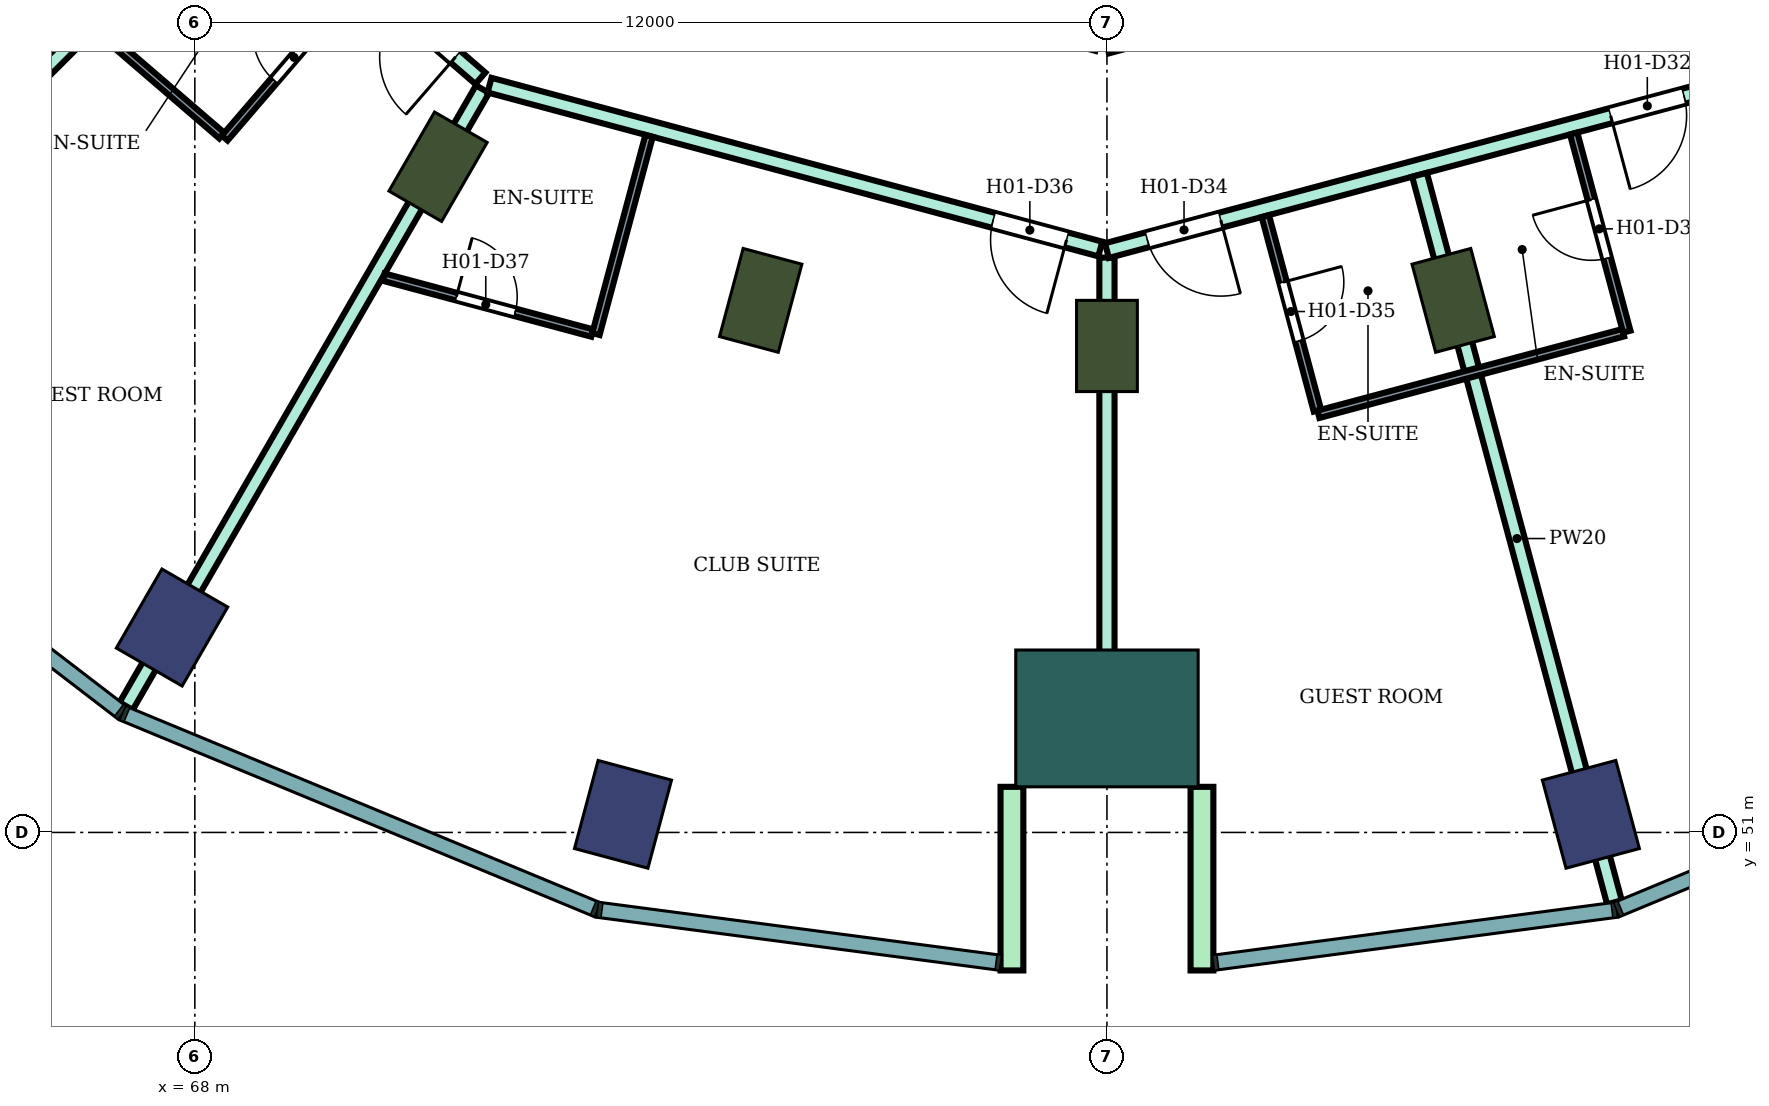
"""IFC4 building model, lengths in metres.
Left out: names, types, materials, properties, quantities, classifications, styles, units other than length and angle.
Written with IfcOpenShell. Run it as: python <this file> out.ifc"""

import sys

from ifc_helpers import new_model, si_unit, direction, frame, frame_2d, origin, origin_2d, place, context, subcontext, project, spatial, rectangle, extrude, element, fill, save


model = new_model("IFC4")
c1 = context("Model", 3, precision=1e-05, world=origin(), true_north=direction((0.0, 1.0)))
c2 = subcontext(c1, "Body", "Model", "MODEL_VIEW")
j1 = project(units=[si_unit("LENGTHUNIT", "METRE"), si_unit("PLANEANGLEUNIT", "RADIAN")], contexts=[c1])
p1 = place(None, origin())
s1 = spatial("IfcSite", under=j1, at=p1, CompositionType="ELEMENT")
p2 = place(p1, origin())
s2 = spatial("IfcBuilding", under=s1, at=p2, CompositionType="ELEMENT")
p3 = place(p2, frame((0.0, 0.0, 32.6)))
s3 = spatial("IfcBuildingStorey", under=s2, at=p3, CompositionType="ELEMENT", Elevation=32.6)
for number, where, z_axis, x_axis in (
    (1, (67.7, 53.696, 0.0), (0.0, 0.0, 1.0), (-0.5, -0.866, 0.0)),
    (2, (73.633, 51.238, 0.0), (0.0, 0.0, 1.0), (-0.259, -0.966, 0.0)),
    (3, (86.367, 51.238, 0.0), (0.0, 0.0, 1.0), (0.259, -0.966, 0.0)),
):
    element("IfcColumn", number, at=place(p3, frame(where, z_axis=z_axis, x_axis=x_axis)), inside=s3, PredefinedType="COLUMN", context=c2, shape_type="SweptSolid", body=[
        extrude(rectangle(XDim=1.2, YDim=1.0, at=origin_2d()), origin(), (0.0, 0.0, 1.0), 3.8),
    ])
for number, where, z_axis, x_axis in (
    (4, (71.2, 59.758, 0.0), (0.0, 0.0, 1.0), (-0.5, -0.866, 0.0)),
    (5, (75.445, 58.0, 0.0), (0.0, 0.0, 1.0), (-0.259, -0.966, 0.0)),
    (6, (80.0, 57.4, 0.0), (0.0, 0.0, 1.0), (0.0, -1.0, 0.0)),
    (7, (84.555, 58.0, 0.0), (0.0, 0.0, 1.0), (0.259, -0.966, 0.0)),
):
    element("IfcColumn", number, at=place(p3, frame(where, z_axis=z_axis, x_axis=x_axis)), inside=s3, PredefinedType="COLUMN", context=c2, shape_type="SweptSolid", body=[
        extrude(rectangle(XDim=1.2, YDim=0.8, at=origin_2d()), origin(), (0.0, 0.0, 1.0), 3.8),
    ])
p4 = place(p3, frame((80.0, 52.5, 0.0), z_axis=(0.0, 0.0, 1.0), x_axis=(0.0, -1.0, 0.0)))
e8 = element("IfcColumn", 8, at=p4, inside=s3, PredefinedType="COLUMN", context=c2, shape_type="SweptSolid", body=[
    extrude(rectangle(XDim=1.8, YDim=2.4, at=origin_2d()), origin(), (0.0, 0.0, 1.0), 3.8),
])
for number, where, z_axis, x_axis in (
    (9, (78.75, 51.6, 0.0), (0.0, 0.0, 1.0), (0.0, -1.0, 0.0)),
    (10, (81.25, 51.6, 0.0), (0.0, 0.0, 1.0), (0.0, -1.0, 0.0)),
):
    element("IfcWall", number, at=place(p3, frame(where, z_axis=z_axis, x_axis=x_axis)), inside=s3, PredefinedType="NOTDEFINED", context=c2, shape_type="SweptSolid", body=[
        extrude(rectangle(XDim=2.416, YDim=0.3, at=frame_2d((1.208, 0.0))), origin(), (0.0, 0.0, 1.0), 3.8),
    ])
p5 = place(p3, frame((63.592, 58.599, 0.0), z_axis=(0.0, 0.0, 1.0), x_axis=(0.707228748718, 0.706984792613, 0.0)))
e11 = element("IfcWall", 11, at=p5, inside=s3, PredefinedType="PARTITIONING", context=c2, shape_type="SweptSolid", body=[
    extrude(rectangle(XDim=7.005, YDim=0.2, at=frame_2d((3.503, 0.0))), origin(), (0.0, 0.0, 1.0), 3.35),
])
p6 = place(p3, frame((67.078, 64.968, 0.0), z_axis=(0.0, 0.0, 1.0), x_axis=(0.756371089567, -0.654142778656, 0.0)))
e12 = element("IfcWall", 12, at=p6, inside=s3, PredefinedType="PARTITIONING", context=c2, shape_type="SweptSolid", body=[
    extrude(rectangle(XDim=6.185, YDim=0.2, at=frame_2d((3.093, 0.0))), origin(), (0.0, 0.0, 1.0), 3.35),
])
p7 = place(p6, frame((4.755, 0.0, 0.0)))
e13 = element("IfcOpeningElement", 13, at=p7, cuts=e12, PredefinedType="OPENING", context=c2, shape_type="SweptSolid", body=[
    extrude(rectangle(XDim=1.0, YDim=2.1, at=frame_2d((0.5, 1.05))), frame((0.0, 0.11, 0.0), z_axis=(0.0, -1.0, 0.0), x_axis=(1.0, 0.0, 0.0)), (0.0, 0.0, 1.0), 0.22),
])
p8 = place(p3, frame((67.096, 52.662, 0.0), z_axis=(0.0, 0.0, 1.0), x_axis=(0.500242450002, 0.865885379953, 0.0)))
e14 = element("IfcWall", 14, at=p8, inside=s3, PredefinedType="PARTITIONING", context=c2, shape_type="SweptSolid", body=[
    extrude(rectangle(XDim=9.374, YDim=0.2, at=frame_2d((4.687, 0.0))), origin(), (0.0, 0.0, 1.0), 3.35),
])
p9 = place(p3, frame((71.877, 60.831, 0.0), z_axis=(0.0, 0.0, 1.0), x_axis=(0.965852509869, -0.259092510851, 0.0)))
e15 = element("IfcWall", 15, at=p9, inside=s3, PredefinedType="PARTITIONING", context=c2, shape_type="SweptSolid", body=[
    extrude(rectangle(XDim=8.32, YDim=0.2, at=frame_2d((4.16, 0.0))), origin(), (0.0, 0.0, 1.0), 3.35),
])
p10 = place(p9, frame((6.86, 0.0, 0.0)))
e16 = element("IfcOpeningElement", 16, at=p10, cuts=e15, PredefinedType="OPENING", context=c2, shape_type="SweptSolid", body=[
    extrude(rectangle(XDim=1.0, YDim=2.1, at=frame_2d((0.5, 1.05))), frame((0.0, 0.11, 0.0), z_axis=(0.0, -1.0, 0.0), x_axis=(1.0, 0.0, 0.0)), (0.0, 0.0, 1.0), 0.22),
])
p11 = place(p3, frame((80.0, 51.801, 0.0), z_axis=(0.0, 0.0, 1.0), x_axis=(0.0, 1.0, 0.0)))
e17 = element("IfcWall", 17, at=p11, inside=s3, PredefinedType="PARTITIONING", context=c2, shape_type="SweptSolid", body=[
    extrude(rectangle(XDim=6.762, YDim=0.2, at=frame_2d((3.381, 0.0))), origin(), (0.0, 0.0, 1.0), 3.35),
])
p12 = place(p3, frame((80.0, 58.655, 0.0), z_axis=(0.0, 0.0, 1.0), x_axis=(0.965974635626, 0.258636817424, 0.0)))
e18 = element("IfcWall", 18, at=p12, inside=s3, PredefinedType="PARTITIONING", context=c2, shape_type="SweptSolid", body=[
    extrude(rectangle(XDim=8.36, YDim=0.2, at=frame_2d((4.18, 0.0))), origin(), (0.0, 0.0, 1.0), 3.35),
])
p13 = place(p12, frame((6.86, 0.0, 0.0)))
e19 = element("IfcOpeningElement", 19, at=p13, cuts=e18, PredefinedType="OPENING", context=c2, shape_type="SweptSolid", body=[
    extrude(rectangle(XDim=1.0, YDim=2.1, at=frame_2d((0.5, 1.05))), frame((0.0, 0.11, 0.0), z_axis=(0.0, -1.0, 0.0), x_axis=(1.0, 0.0, 0.0)), (0.0, 0.0, 1.0), 0.22),
])
p14 = place(p12, frame((0.55, 0.0, 0.0)))
e20 = element("IfcOpeningElement", 20, at=p14, cuts=e18, PredefinedType="OPENING", context=c2, shape_type="SweptSolid", body=[
    extrude(rectangle(XDim=1.0, YDim=2.1, at=frame_2d((0.5, 1.05))), frame((0.0, 0.11, 0.0), z_axis=(0.0, -1.0, 0.0), x_axis=(1.0, 0.0, 0.0)), (0.0, 0.0, 1.0), 0.22),
])
p15 = place(p3, frame((80.0, 61.346, 0.0), z_axis=(0.0, 0.0, 1.0), x_axis=(0.965924181808, 0.258825182312, 0.0)))
e21 = element("IfcWall", 21, at=p15, inside=s3, PredefinedType="PARTITIONING", context=c2, shape_type="SweptSolid", body=[
    extrude(rectangle(XDim=6.94, YDim=0.2, at=frame_2d((3.47, 0.0))), origin(), (0.0, 0.0, 1.0), 3.35),
])
p16 = place(p15, frame((0.55, 0.0, 0.0)))
e22 = element("IfcOpeningElement", 22, at=p16, cuts=e21, PredefinedType="OPENING", context=c2, shape_type="SweptSolid", body=[
    extrude(rectangle(XDim=1.0, YDim=2.1, at=frame_2d((0.5, 1.05))), frame((0.0, 0.11, 0.0), z_axis=(0.0, -1.0, 0.0), x_axis=(1.0, 0.0, 0.0)), (0.0, 0.0, 1.0), 0.22),
])
p17 = place(p3, frame((84.112, 59.652, 0.0), z_axis=(0.0, 0.0, 1.0), x_axis=(0.258791091927, -0.965933315886, 0.0)))
e23 = element("IfcWall", 23, at=p17, inside=s3, PredefinedType="PARTITIONING", context=c2, shape_type="SweptSolid", body=[
    extrude(rectangle(XDim=9.909, YDim=0.2, at=frame_2d((4.955, 0.0))), origin(), (0.0, 0.0, 1.0), 3.35),
])
p18 = place(p3, frame((65.209, 62.875, 0.0), z_axis=(0.0, 0.0, 1.0), x_axis=(0.757930378138, -0.652335451969, 0.0)))
e24 = element("IfcWall", 24, at=p18, inside=s3, PredefinedType="PARTITIONING", context=c2, shape_type="SweptSolid", body=[
    extrude(rectangle(XDim=4.15, YDim=0.1, at=frame_2d((2.075, 0.0))), origin(), (0.0, 0.0, 1.0), 3.35),
])
p19 = place(p3, frame((68.393, 60.135, 0.0), z_axis=(0.0, 0.0, 1.0), x_axis=(0.652061182569, 0.758166349944, 0.0)))
e25 = element("IfcWall", 25, at=p19, inside=s3, PredefinedType="PARTITIONING", context=c2, shape_type="SweptSolid", body=[
    extrude(rectangle(XDim=2.69, YDim=0.1, at=frame_2d((1.345, 0.0))), origin(), (0.0, 0.0, 1.0), 3.35),
])
p20 = place(p19, frame((1.0, 0.0, 0.0)))
e26 = element("IfcOpeningElement", 26, at=p20, cuts=e25, PredefinedType="OPENING", context=c2, shape_type="SweptSolid", body=[
    extrude(rectangle(XDim=0.8, YDim=2.1, at=frame_2d((0.4, 1.05))), frame((0.0, 0.06, 0.0), z_axis=(0.0, -1.0, 0.0), x_axis=(1.0, 0.0, 0.0)), (0.0, 0.0, 1.0), 0.12),
])
p21 = place(p3, frame((70.484, 58.305, 0.0), z_axis=(0.0, 0.0, 1.0), x_axis=(0.965904703781, -0.258897862512, 0.0)))
e27 = element("IfcWall", 27, at=p21, inside=s3, PredefinedType="PARTITIONING", context=c2, shape_type="SweptSolid", body=[
    extrude(rectangle(XDim=2.841, YDim=0.1, at=frame_2d((1.421, 0.0))), origin(), (0.0, 0.0, 1.0), 3.35),
])
p22 = place(p21, frame((0.99, 0.0, 0.0)))
e28 = element("IfcOpeningElement", 28, at=p22, cuts=e27, PredefinedType="OPENING", context=c2, shape_type="SweptSolid", body=[
    extrude(rectangle(XDim=0.8, YDim=2.1, at=frame_2d((0.4, 1.05))), frame((0.0, 0.06, 0.0), z_axis=(0.0, -1.0, 0.0), x_axis=(1.0, 0.0, 0.0)), (0.0, 0.0, 1.0), 0.12),
])
p23 = place(p3, frame((73.277, 57.557, 0.0), z_axis=(0.0, 0.0, 1.0), x_axis=(0.258928960762, 0.965896367774, 0.0)))
e29 = element("IfcWall", 29, at=p23, inside=s3, PredefinedType="PARTITIONING", context=c2, shape_type="SweptSolid", body=[
    extrude(rectangle(XDim=2.699, YDim=0.1, at=frame_2d((1.35, 0.0))), origin(), (0.0, 0.0, 1.0), 3.35),
])
p24 = place(p3, frame((82.084, 59.108, 0.0), z_axis=(0.0, 0.0, 1.0), x_axis=(0.258591746437, -0.965986702121, 0.0)))
e30 = element("IfcWall", 30, at=p24, inside=s3, PredefinedType="PARTITIONING", context=c2, shape_type="SweptSolid", body=[
    extrude(rectangle(XDim=2.649, YDim=0.1, at=frame_2d((1.325, 0.0))), origin(), (0.0, 0.0, 1.0), 3.35),
])
p25 = place(p24, frame((0.9, 0.0, 0.0)))
e31 = element("IfcOpeningElement", 31, at=p25, cuts=e30, PredefinedType="OPENING", context=c2, shape_type="SweptSolid", body=[
    extrude(rectangle(XDim=0.8, YDim=2.1, at=frame_2d((0.4, 1.05))), frame((0.0, 0.06, 0.0), z_axis=(0.0, -1.0, 0.0), x_axis=(1.0, 0.0, 0.0)), (0.0, 0.0, 1.0), 0.12),
])
p26 = place(p3, frame((82.782, 56.501, 0.0), z_axis=(0.0, 0.0, 1.0), x_axis=(0.965999228418, 0.258544949083, 0.0)))
e32 = element("IfcWall", 32, at=p26, inside=s3, PredefinedType="PARTITIONING", context=c2, shape_type="SweptSolid", body=[
    extrude(rectangle(XDim=4.15, YDim=0.1, at=frame_2d((2.075, 0.0))), origin(), (0.0, 0.0, 1.0), 3.35),
])
p27 = place(p3, frame((86.14, 60.196, 0.0), z_axis=(0.0, 0.0, 1.0), x_axis=(0.258945475746, -0.965891940432, 0.0)))
e33 = element("IfcWall", 33, at=p27, inside=s3, PredefinedType="PARTITIONING", context=c2, shape_type="SweptSolid", body=[
    extrude(rectangle(XDim=2.7, YDim=0.1, at=frame_2d((1.35, 0.0))), origin(), (0.0, 0.0, 1.0), 3.35),
])
p28 = place(p27, frame((0.9, 0.0, 0.0)))
e34 = element("IfcOpeningElement", 34, at=p28, cuts=e33, PredefinedType="OPENING", context=c2, shape_type="SweptSolid", body=[
    extrude(rectangle(XDim=0.8, YDim=2.1, at=frame_2d((0.4, 1.05))), frame((0.0, 0.06, 0.0), z_axis=(0.0, -1.0, 0.0), x_axis=(1.0, 0.0, 0.0)), (0.0, 0.0, 1.0), 0.12),
])
p29 = place(p13, frame((1.0, 0.0, 0.0), z_axis=(0.0, 0.0, 1.0), x_axis=(-1.0, 0.0, 0.0)))
e35 = element("IfcDoor", 35, at=p29, inside=s3, OperationType="SINGLE_SWING_RIGHT", PredefinedType="DOOR", context=c2, shape_type="SweptSolid", body=[
    extrude(rectangle(XDim=1.0, YDim=2.1, at=frame_2d((0.5, 1.05))), frame((0.0, 0.025, 0.0), z_axis=(0.0, -1.0, 0.0), x_axis=(1.0, 0.0, 0.0)), (0.0, 0.0, 1.0), 0.05),
])
fill(e19, e35)
p30 = place(p28, frame((0.8, 0.0, 0.0), z_axis=(0.0, 0.0, 1.0), x_axis=(-1.0, 0.0, 0.0)))
e36 = element("IfcDoor", 36, at=p30, inside=s3, OperationType="SINGLE_SWING_RIGHT", PredefinedType="DOOR", context=c2, shape_type="SweptSolid", body=[
    extrude(rectangle(XDim=0.8, YDim=2.1, at=frame_2d((0.4, 1.05))), frame((0.0, 0.025, 0.0), z_axis=(0.0, -1.0, 0.0), x_axis=(1.0, 0.0, 0.0)), (0.0, 0.0, 1.0), 0.05),
])
fill(e34, e36)
p31 = place(p14, frame((1.0, 0.0, 0.0), z_axis=(0.0, 0.0, 1.0), x_axis=(-1.0, 0.0, 0.0)))
e37 = element("IfcDoor", 37, at=p31, inside=s3, OperationType="SINGLE_SWING_LEFT", PredefinedType="DOOR", context=c2, shape_type="SweptSolid", body=[
    extrude(rectangle(XDim=1.0, YDim=2.1, at=frame_2d((0.5, 1.05))), frame((0.0, 0.025, 0.0), z_axis=(0.0, -1.0, 0.0), x_axis=(1.0, 0.0, 0.0)), (0.0, 0.0, 1.0), 0.05),
])
fill(e20, e37)
p32 = place(p25, origin())
e38 = element("IfcDoor", 38, at=p32, inside=s3, OperationType="SINGLE_SWING_LEFT", PredefinedType="DOOR", context=c2, shape_type="SweptSolid", body=[
    extrude(rectangle(XDim=0.8, YDim=2.1, at=frame_2d((0.4, 1.05))), frame((0.0, 0.025, 0.0), z_axis=(0.0, -1.0, 0.0), x_axis=(1.0, 0.0, 0.0)), (0.0, 0.0, 1.0), 0.05),
])
fill(e31, e38)
p33 = place(p10, frame((1.0, 0.0, 0.0), z_axis=(0.0, 0.0, 1.0), x_axis=(-1.0, 0.0, 0.0)))
e39 = element("IfcDoor", 39, at=p33, inside=s3, OperationType="SINGLE_SWING_LEFT", PredefinedType="DOOR", context=c2, shape_type="SweptSolid", body=[
    extrude(rectangle(XDim=1.0, YDim=2.1, at=frame_2d((0.5, 1.05))), frame((0.0, 0.025, 0.0), z_axis=(0.0, -1.0, 0.0), x_axis=(1.0, 0.0, 0.0)), (0.0, 0.0, 1.0), 0.05),
])
fill(e16, e39)
p34 = place(p22, origin())
e40 = element("IfcDoor", 40, at=p34, inside=s3, OperationType="SINGLE_SWING_LEFT", PredefinedType="DOOR", context=c2, shape_type="SweptSolid", body=[
    extrude(rectangle(XDim=0.8, YDim=2.1, at=frame_2d((0.4, 1.05))), frame((0.0, 0.025, 0.0), z_axis=(0.0, -1.0, 0.0), x_axis=(1.0, 0.0, 0.0)), (0.0, 0.0, 1.0), 0.05),
])
fill(e28, e40)
p35 = place(p7, frame((1.0, 0.0, 0.0), z_axis=(0.0, 0.0, 1.0), x_axis=(-1.0, 0.0, 0.0)))
e41 = element("IfcDoor", 41, at=p35, inside=s3, OperationType="SINGLE_SWING_LEFT", PredefinedType="DOOR", context=c2, shape_type="SweptSolid", body=[
    extrude(rectangle(XDim=1.0, YDim=2.1, at=frame_2d((0.5, 1.05))), frame((0.0, 0.025, 0.0), z_axis=(0.0, -1.0, 0.0), x_axis=(1.0, 0.0, 0.0)), (0.0, 0.0, 1.0), 0.05),
])
fill(e13, e41)
p36 = place(p20, origin())
e42 = element("IfcDoor", 42, at=p36, inside=s3, OperationType="SINGLE_SWING_RIGHT", PredefinedType="DOOR", context=c2, shape_type="SweptSolid", body=[
    extrude(rectangle(XDim=0.8, YDim=2.1, at=frame_2d((0.4, 1.05))), frame((0.0, 0.025, 0.0), z_axis=(0.0, -1.0, 0.0), x_axis=(1.0, 0.0, 0.0)), (0.0, 0.0, 1.0), 0.05),
])
fill(e26, e42)
save(model, sys.argv[1])
